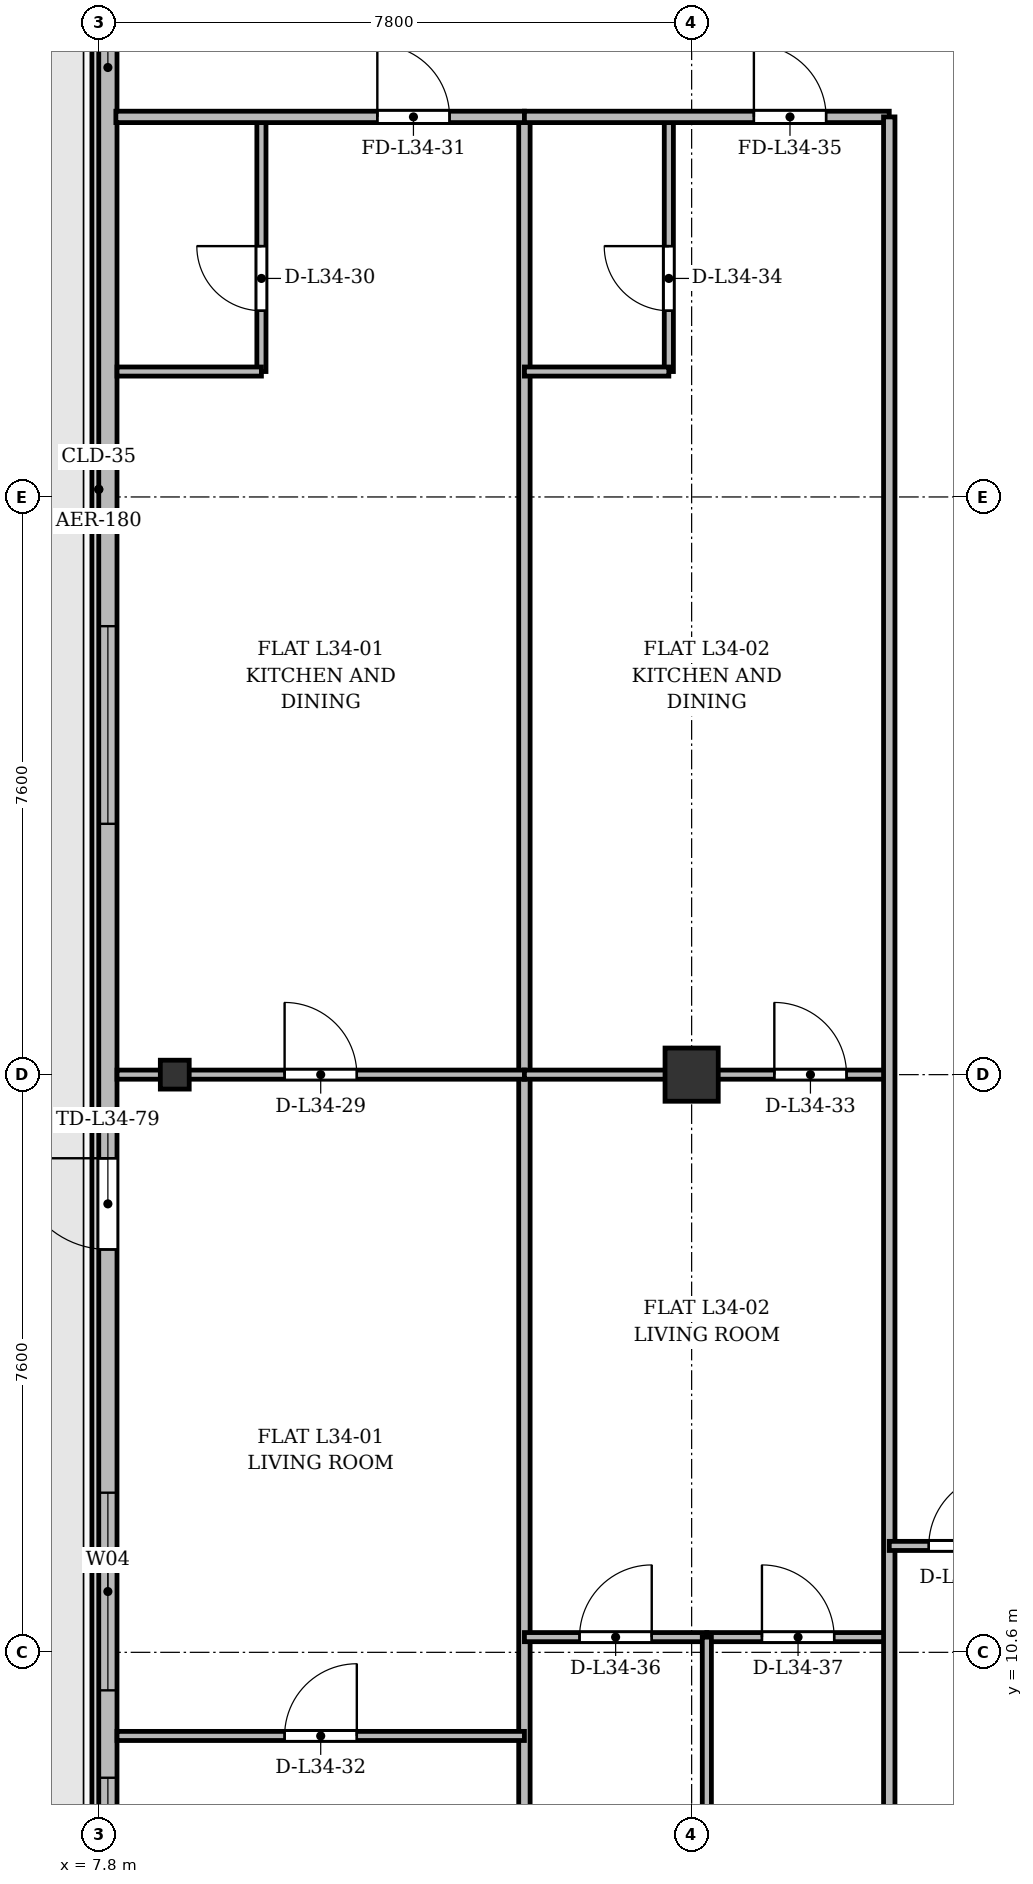
"""IFC4 building model, lengths in metres.
Left out: names, types, materials, properties, quantities, classifications, styles, units other than length and angle.
Written with IfcOpenShell. Run it as: python <this file> out.ifc"""

import sys

from ifc_helpers import new_model, si_unit, direction, frame, frame_2d, origin, origin_2d, place, context, subcontext, project, spatial, rectangle, i_section, extrude, source, transform, mapped, element, fill, save


model = new_model("IFC4")
c1 = context("Model", 3, precision=1e-05, world=origin(), true_north=direction((0.0, 1.0)))
c2 = subcontext(c1, "Body", "Model", "MODEL_VIEW")
j1 = project(units=[si_unit("LENGTHUNIT", "METRE"), si_unit("PLANEANGLEUNIT", "RADIAN")], contexts=[c1])
p1 = place(None, origin())
s1 = spatial("IfcSite", under=j1, at=p1, CompositionType="ELEMENT")
p2 = place(p1, origin())
s2 = spatial("IfcBuilding", under=s1, at=p2, CompositionType="ELEMENT")
p3 = place(p2, frame((0.0, 0.0, 132.1)))
s3 = spatial("IfcBuildingStorey", under=s2, at=p3, CompositionType="ELEMENT", Elevation=132.1)
m1 = source(origin(), c2, "Body", "SweptSolid", [
    extrude(i_section(OverallWidth=0.38, OverallDepth=0.38, WebThickness=0.02, FlangeThickness=0.03, at=origin_2d()), origin(), (0.0, 0.0, 1.0), 3.6),
])
p4 = place(p3, frame((8.8, 18.2, 0.0), z_axis=(0.0, 0.0, 1.0), x_axis=(1.0, 0.0, 0.0)))
e1 = element("IfcColumn", 1, at=p4, inside=s3, PredefinedType="COLUMN", context=c2, shape_type="MappedRepresentation", body=[
    mapped(m1, transform((0.0, 0.0, 0.0), x_axis=(1.0, 0.0, 0.0), y_axis=(0.0, 1.0, 0.0), z_axis=(0.0, 0.0, 1.0), scale=1.0)),
])
m2 = source(origin(), c2, "Body", "SweptSolid", [
    extrude(rectangle(XDim=0.7, YDim=0.7, at=origin_2d()), origin(), (0.0, 0.0, 1.0), 3.6),
])
p5 = place(p3, frame((15.6, 18.2, 0.0), z_axis=(0.0, 0.0, 1.0), x_axis=(1.0, 0.0, 0.0)))
e2 = element("IfcColumn", 2, at=p5, inside=s3, PredefinedType="COLUMN", context=c2, shape_type="MappedRepresentation", body=[
    mapped(m2, transform((0.0, 0.0, 0.0), x_axis=(1.0, 0.0, 0.0), y_axis=(0.0, 1.0, 0.0), z_axis=(0.0, 0.0, 1.0), scale=1.0)),
])
p6 = place(p3, frame((7.92, 6.3, 0.0), z_axis=(0.0, 0.0, 1.0), x_axis=(0.0, 1.0, 0.0)))
e3 = element("IfcWall", 3, at=p6, inside=s3, PredefinedType="SOLIDWALL", context=c2, shape_type="SweptSolid", body=[
    extrude(rectangle(XDim=39.2, YDim=0.24, at=frame_2d((19.6, 0.0))), origin(), (0.0, 0.0, 1.0), 3.35),
])
p7 = place(p6, frame((9.6, 0.0, 0.0)))
e4 = element("IfcOpeningElement", 4, at=p7, cuts=e3, PredefinedType="OPENING", context=c2, shape_type="SweptSolid", body=[
    extrude(rectangle(XDim=1.2, YDim=2.2, at=frame_2d((0.6, 1.1))), frame((0.0, 0.13, 0.0), z_axis=(0.0, -1.0, 0.0), x_axis=(1.0, 0.0, 0.0)), (0.0, 0.0, 1.0), 0.26),
])
p8 = place(p6, frame((1.45, 0.0, 0.92)))
e5 = element("IfcOpeningElement", 5, at=p8, cuts=e3, PredefinedType="OPENING", context=c2, shape_type="SweptSolid", body=[
    extrude(rectangle(XDim=1.2, YDim=1.65, at=frame_2d((0.6, 0.825))), frame((0.0, 0.13, 0.0), z_axis=(0.0, -1.0, 0.0), x_axis=(1.0, 0.0, 0.0)), (0.0, 0.0, 1.0), 0.26),
])
p9 = place(p6, frame((3.8, 0.0, 0.92)))
e6 = element("IfcOpeningElement", 6, at=p9, cuts=e3, PredefinedType="OPENING", context=c2, shape_type="SweptSolid", body=[
    extrude(rectangle(XDim=2.6, YDim=1.9, at=frame_2d((1.3, 0.95))), frame((0.0, 0.13, 0.0), z_axis=(0.0, -1.0, 0.0), x_axis=(1.0, 0.0, 0.0)), (0.0, 0.0, 1.0), 0.26),
])
p10 = place(p6, frame((15.2, 0.0, 0.92)))
e7 = element("IfcOpeningElement", 7, at=p10, cuts=e3, PredefinedType="OPENING", context=c2, shape_type="SweptSolid", body=[
    extrude(rectangle(XDim=2.6, YDim=1.9, at=frame_2d((1.3, 0.95))), frame((0.0, 0.13, 0.0), z_axis=(0.0, -1.0, 0.0), x_axis=(1.0, 0.0, 0.0)), (0.0, 0.0, 1.0), 0.26),
])
p11 = place(p6, frame((33.5, 0.0, 0.92)))
e8 = element("IfcOpeningElement", 8, at=p11, cuts=e3, PredefinedType="OPENING", context=c2, shape_type="SweptSolid", body=[
    extrude(rectangle(XDim=1.2, YDim=1.65, at=frame_2d((0.6, 0.825))), frame((0.0, 0.13, 0.0), z_axis=(0.0, -1.0, 0.0), x_axis=(1.0, 0.0, 0.0)), (0.0, 0.0, 1.0), 0.26),
])
p12 = place(p6, frame((36.85, 0.0, 0.92)))
e9 = element("IfcOpeningElement", 9, at=p12, cuts=e3, PredefinedType="OPENING", context=c2, shape_type="SweptSolid", body=[
    extrude(rectangle(XDim=1.2, YDim=1.65, at=frame_2d((0.6, 0.825))), frame((0.0, 0.13, 0.0), z_axis=(0.0, -1.0, 0.0), x_axis=(1.0, 0.0, 0.0)), (0.0, 0.0, 1.0), 0.26),
])
p13 = place(p3, frame((13.4, 3.525, 0.0), z_axis=(0.0, 0.0, 1.0), x_axis=(0.0, 1.0, 0.0)))
e10 = element("IfcWall", 10, at=p13, inside=s3, PredefinedType="PARTITIONING", context=c2, shape_type="SweptSolid", body=[
    extrude(rectangle(XDim=27.275, YDim=0.15, at=frame_2d((13.638, 0.0))), origin(), (0.0, 0.0, 1.0), 2.75),
])
p14 = place(p3, frame((8.04, 18.2, 0.0), z_axis=(0.0, 0.0, 1.0), x_axis=(1.0, 0.0, 0.0)))
e11 = element("IfcWall", 11, at=p14, inside=s3, PredefinedType="PARTITIONING", context=c2, shape_type="SweptSolid", body=[
    extrude(rectangle(XDim=5.36, YDim=0.12, at=frame_2d((2.68, 0.0))), origin(), (0.0, 0.0, 1.0), 2.75),
])
p15 = place(p14, frame((2.205, 0.0, 0.0)))
e12 = element("IfcOpeningElement", 12, at=p15, cuts=e11, PredefinedType="OPENING", context=c2, shape_type="SweptSolid", body=[
    extrude(rectangle(XDim=0.95, YDim=2.15, at=frame_2d((0.475, 1.075))), frame((0.0, 0.07, 0.0), z_axis=(0.0, -1.0, 0.0), x_axis=(1.0, 0.0, 0.0)), (0.0, 0.0, 1.0), 0.14),
])
p16 = place(p3, frame((9.94, 27.45, 0.0), z_axis=(0.0, 0.0, 1.0), x_axis=(0.0, 1.0, 0.0)))
e13 = element("IfcWall", 13, at=p16, inside=s3, PredefinedType="PARTITIONING", context=c2, shape_type="SweptSolid", body=[
    extrude(rectangle(XDim=3.35, YDim=0.12, at=frame_2d((1.675, 0.0))), origin(), (0.0, 0.0, 1.0), 3.35),
])
p17 = place(p16, frame((0.8, 0.0, 0.0)))
e14 = element("IfcOpeningElement", 14, at=p17, cuts=e13, PredefinedType="OPENING", context=c2, shape_type="SweptSolid", body=[
    extrude(rectangle(XDim=0.85, YDim=2.1, at=frame_2d((0.425, 1.05))), frame((0.0, 0.07, 0.0), z_axis=(0.0, -1.0, 0.0), x_axis=(1.0, 0.0, 0.0)), (0.0, 0.0, 1.0), 0.14),
])
p18 = place(p3, frame((8.04, 27.45, 0.0), z_axis=(0.0, 0.0, 1.0), x_axis=(1.0, 0.0, 0.0)))
e15 = element("IfcWall", 15, at=p18, inside=s3, PredefinedType="PARTITIONING", context=c2, shape_type="SweptSolid", body=[
    extrude(rectangle(XDim=1.9, YDim=0.12, at=frame_2d((0.95, 0.0))), origin(), (0.0, 0.0, 1.0), 2.85),
])
p19 = place(p3, frame((8.025, 30.8, 0.0), z_axis=(0.0, 0.0, 1.0), x_axis=(1.0, 0.0, 0.0)))
e16 = element("IfcWall", 16, at=p19, inside=s3, PredefinedType="PARTITIONING", context=c2, shape_type="SweptSolid", body=[
    extrude(rectangle(XDim=5.375, YDim=0.15, at=frame_2d((2.688, 0.0))), origin(), (0.0, 0.0, 1.0), 2.85),
])
p20 = place(p19, frame((3.44, 0.0, 0.0)))
e17 = element("IfcOpeningElement", 17, at=p20, cuts=e16, PredefinedType="OPENING", context=c2, shape_type="SweptSolid", body=[
    extrude(rectangle(XDim=0.95, YDim=2.15, at=frame_2d((0.475, 1.075))), frame((0.0, 0.085, 0.0), z_axis=(0.0, -1.0, 0.0), x_axis=(1.0, 0.0, 0.0)), (0.0, 0.0, 1.0), 0.17),
])
p21 = place(p3, frame((8.04, 9.5, 0.0), z_axis=(0.0, 0.0, 1.0), x_axis=(1.0, 0.0, 0.0)))
e18 = element("IfcWall", 18, at=p21, inside=s3, PredefinedType="PARTITIONING", context=c2, shape_type="SweptSolid", body=[
    extrude(rectangle(XDim=5.36, YDim=0.12, at=frame_2d((2.68, 0.0))), origin(), (0.0, 0.0, 1.0), 2.85),
])
p22 = place(p21, frame((2.205, 0.0, 0.0)))
e19 = element("IfcOpeningElement", 19, at=p22, cuts=e18, PredefinedType="OPENING", context=c2, shape_type="SweptSolid", body=[
    extrude(rectangle(XDim=0.95, YDim=2.15, at=frame_2d((0.475, 1.075))), frame((0.0, 0.07, 0.0), z_axis=(0.0, -1.0, 0.0), x_axis=(1.0, 0.0, 0.0)), (0.0, 0.0, 1.0), 0.14),
])
p23 = place(p3, frame((13.4, 18.2, 0.0), z_axis=(0.0, 0.0, 1.0), x_axis=(1.0, 0.0, 0.0)))
e20 = element("IfcWall", 20, at=p23, inside=s3, PredefinedType="PARTITIONING", context=c2, shape_type="SweptSolid", body=[
    extrude(rectangle(XDim=4.8, YDim=0.12, at=frame_2d((2.4, 0.0))), origin(), (0.0, 0.0, 1.0), 2.75),
])
p24 = place(p23, frame((3.288, 0.0, 0.0)))
e21 = element("IfcOpeningElement", 21, at=p24, cuts=e20, PredefinedType="OPENING", context=c2, shape_type="SweptSolid", body=[
    extrude(rectangle(XDim=0.95, YDim=2.15, at=frame_2d((0.475, 1.075))), frame((0.0, 0.07, 0.0), z_axis=(0.0, -1.0, 0.0), x_axis=(1.0, 0.0, 0.0)), (0.0, 0.0, 1.0), 0.14),
])
p25 = place(p3, frame((15.3, 27.45, 0.0), z_axis=(0.0, 0.0, 1.0), x_axis=(0.0, 1.0, 0.0)))
e22 = element("IfcWall", 22, at=p25, inside=s3, PredefinedType="PARTITIONING", context=c2, shape_type="SweptSolid", body=[
    extrude(rectangle(XDim=3.35, YDim=0.12, at=frame_2d((1.675, 0.0))), origin(), (0.0, 0.0, 1.0), 3.35),
])
p26 = place(p25, frame((0.8, 0.0, 0.0)))
e23 = element("IfcOpeningElement", 23, at=p26, cuts=e22, PredefinedType="OPENING", context=c2, shape_type="SweptSolid", body=[
    extrude(rectangle(XDim=0.85, YDim=2.1, at=frame_2d((0.425, 1.05))), frame((0.0, 0.07, 0.0), z_axis=(0.0, -1.0, 0.0), x_axis=(1.0, 0.0, 0.0)), (0.0, 0.0, 1.0), 0.14),
])
p27 = place(p3, frame((13.4, 27.45, 0.0), z_axis=(0.0, 0.0, 1.0), x_axis=(1.0, 0.0, 0.0)))
e24 = element("IfcWall", 24, at=p27, inside=s3, PredefinedType="PARTITIONING", context=c2, shape_type="SweptSolid", body=[
    extrude(rectangle(XDim=1.9, YDim=0.12, at=frame_2d((0.95, 0.0))), origin(), (0.0, 0.0, 1.0), 3.35),
])
p28 = place(p3, frame((13.4, 30.8, 0.0), z_axis=(0.0, 0.0, 1.0), x_axis=(1.0, 0.0, 0.0)))
e25 = element("IfcWall", 25, at=p28, inside=s3, PredefinedType="PARTITIONING", context=c2, shape_type="SweptSolid", body=[
    extrude(rectangle(XDim=4.8, YDim=0.15, at=frame_2d((2.4, 0.0))), origin(), (0.0, 0.0, 1.0), 2.85),
])
p29 = place(p28, frame((3.019, 0.0, 0.0)))
e26 = element("IfcOpeningElement", 26, at=p29, cuts=e25, PredefinedType="OPENING", context=c2, shape_type="SweptSolid", body=[
    extrude(rectangle(XDim=0.95, YDim=2.15, at=frame_2d((0.475, 1.075))), frame((0.0, 0.085, 0.0), z_axis=(0.0, -1.0, 0.0), x_axis=(1.0, 0.0, 0.0)), (0.0, 0.0, 1.0), 0.17),
])
p30 = place(p3, frame((13.4, 10.8, 0.0), z_axis=(0.0, 0.0, 1.0), x_axis=(1.0, 0.0, 0.0)))
e27 = element("IfcWall", 27, at=p30, inside=s3, PredefinedType="PARTITIONING", context=c2, shape_type="SweptSolid", body=[
    extrude(rectangle(XDim=2.4, YDim=0.12, at=frame_2d((1.2, 0.0))), origin(), (0.0, 0.0, 1.0), 2.85),
])
p31 = place(p30, frame((0.725, 0.0, 0.0)))
e28 = element("IfcOpeningElement", 28, at=p31, cuts=e27, PredefinedType="OPENING", context=c2, shape_type="SweptSolid", body=[
    extrude(rectangle(XDim=0.95, YDim=2.15, at=frame_2d((0.475, 1.075))), frame((0.0, 0.07, 0.0), z_axis=(0.0, -1.0, 0.0), x_axis=(1.0, 0.0, 0.0)), (0.0, 0.0, 1.0), 0.14),
])
p32 = place(p3, frame((15.8, 10.8, 0.0), z_axis=(0.0, 0.0, 1.0), x_axis=(1.0, 0.0, 0.0)))
e29 = element("IfcWall", 29, at=p32, inside=s3, PredefinedType="PARTITIONING", context=c2, shape_type="SweptSolid", body=[
    extrude(rectangle(XDim=2.4, YDim=0.12, at=frame_2d((1.2, 0.0))), origin(), (0.0, 0.0, 1.0), 3.0),
])
p33 = place(p32, frame((0.725, 0.0, 0.0)))
e30 = element("IfcOpeningElement", 30, at=p33, cuts=e29, PredefinedType="OPENING", context=c2, shape_type="SweptSolid", body=[
    extrude(rectangle(XDim=0.95, YDim=2.15, at=frame_2d((0.475, 1.075))), frame((0.0, 0.07, 0.0), z_axis=(0.0, -1.0, 0.0), x_axis=(1.0, 0.0, 0.0)), (0.0, 0.0, 1.0), 0.14),
])
p34 = place(p3, frame((15.8, 3.525, 0.0), z_axis=(0.0, 0.0, 1.0), x_axis=(0.0, 1.0, 0.0)))
e31 = element("IfcWall", 31, at=p34, inside=s3, PredefinedType="PARTITIONING", context=c2, shape_type="SweptSolid", body=[
    extrude(rectangle(XDim=7.275, YDim=0.12, at=frame_2d((3.638, 0.0))), origin(), (0.0, 0.0, 1.0), 2.75),
])
p35 = place(p3, frame((18.2, 3.525, 0.0), z_axis=(0.0, 0.0, 1.0), x_axis=(0.0, 1.0, 0.0)))
e32 = element("IfcWall", 32, at=p35, inside=s3, PredefinedType="PARTITIONING", context=c2, shape_type="SweptSolid", body=[
    extrude(rectangle(XDim=27.275, YDim=0.15, at=frame_2d((13.638, 0.0))), origin(), (0.0, 0.0, 1.0), 2.75),
])
p36 = place(p3, frame((18.2, 12.0, 0.0), z_axis=(0.0, 0.0, 1.0), x_axis=(1.0, 0.0, 0.0)))
e33 = element("IfcWall", 33, at=p36, inside=s3, PredefinedType="PARTITIONING", context=c2, shape_type="SweptSolid", body=[
    extrude(rectangle(XDim=2.0, YDim=0.12, at=frame_2d((1.0, 0.0))), origin(), (0.0, 0.0, 1.0), 3.35),
])
p37 = place(p36, frame((0.52, 0.0, 0.0)))
e34 = element("IfcOpeningElement", 34, at=p37, cuts=e33, PredefinedType="OPENING", context=c2, shape_type="SweptSolid", body=[
    extrude(rectangle(XDim=0.95, YDim=2.15, at=frame_2d((0.475, 1.075))), frame((0.0, 0.07, 0.0), z_axis=(0.0, -1.0, 0.0), x_axis=(1.0, 0.0, 0.0)), (0.0, 0.0, 1.0), 0.14),
])
m3 = source(origin(), c2, "Body", "SweptSolid", [
    extrude(rectangle(XDim=1.2, YDim=2.2, at=frame_2d((0.6, 1.1))), frame((0.0, 0.025, 0.0), z_axis=(0.0, -1.0, 0.0), x_axis=(1.0, 0.0, 0.0)), (0.0, 0.0, 1.0), 0.05),
])
p38 = place(p7, origin())
e35 = element("IfcDoor", 35, at=p38, inside=s3, OperationType="SINGLE_SWING_RIGHT", PredefinedType="DOOR", context=c2, shape_type="MappedRepresentation", body=[
    mapped(m3, transform((0.0, 0.0, 0.0), x_axis=(1.0, 0.0, 0.0), y_axis=(0.0, 1.0, 0.0), z_axis=(0.0, 0.0, 1.0), scale=1.0)),
])
fill(e4, e35)
m4 = source(origin(), c2, "Body", "SweptSolid", [
    extrude(rectangle(XDim=1.2, YDim=1.65, at=frame_2d((0.6, 0.825))), frame((0.0, 0.03, 0.0), z_axis=(0.0, -1.0, 0.0), x_axis=(1.0, 0.0, 0.0)), (0.0, 0.0, 1.0), 0.06),
])
p39 = place(p8, origin())
e36 = element("IfcWindow", 36, at=p39, inside=s3, PartitioningType="SINGLE_PANEL", PredefinedType="WINDOW", context=c2, shape_type="MappedRepresentation", body=[
    mapped(m4, transform((0.0, 0.0, 0.0), x_axis=(1.0, 0.0, 0.0), y_axis=(0.0, 1.0, 0.0), z_axis=(0.0, 0.0, 1.0), scale=1.0)),
])
fill(e5, e36)
m5 = source(origin(), c2, "Body", "SweptSolid", [
    extrude(rectangle(XDim=2.6, YDim=1.9, at=frame_2d((1.3, 0.95))), frame((0.0, 0.03, 0.0), z_axis=(0.0, -1.0, 0.0), x_axis=(1.0, 0.0, 0.0)), (0.0, 0.0, 1.0), 0.06),
])
p40 = place(p9, origin())
e37 = element("IfcWindow", 37, at=p40, inside=s3, PartitioningType="SINGLE_PANEL", PredefinedType="WINDOW", context=c2, shape_type="MappedRepresentation", body=[
    mapped(m5, transform((0.0, 0.0, 0.0), x_axis=(1.0, 0.0, 0.0), y_axis=(0.0, 1.0, 0.0), z_axis=(0.0, 0.0, 1.0), scale=1.0)),
])
fill(e6, e37)
p41 = place(p10, origin())
e38 = element("IfcWindow", 38, at=p41, inside=s3, PartitioningType="SINGLE_PANEL", PredefinedType="WINDOW", context=c2, shape_type="MappedRepresentation", body=[
    mapped(m5, transform((0.0, 0.0, 0.0), x_axis=(1.0, 0.0, 0.0), y_axis=(0.0, 1.0, 0.0), z_axis=(0.0, 0.0, 1.0), scale=1.0)),
])
fill(e7, e38)
m6 = source(origin(), c2, "Body", "SweptSolid", [
    extrude(rectangle(XDim=0.95, YDim=2.15, at=frame_2d((0.475, 1.075))), frame((0.0, 0.025, 0.0), z_axis=(0.0, -1.0, 0.0), x_axis=(1.0, 0.0, 0.0)), (0.0, 0.0, 1.0), 0.05),
])
p42 = place(p15, origin())
e39 = element("IfcDoor", 39, at=p42, inside=s3, OperationType="SINGLE_SWING_LEFT", PredefinedType="DOOR", context=c2, shape_type="MappedRepresentation", body=[
    mapped(m6, transform((0.0, 0.0, 0.0), x_axis=(1.0, 0.0, 0.0), y_axis=(0.0, 1.0, 0.0), z_axis=(0.0, 0.0, 1.0), scale=1.0)),
])
fill(e12, e39)
m7 = source(origin(), c2, "Body", "SweptSolid", [
    extrude(rectangle(XDim=0.85, YDim=2.1, at=frame_2d((0.425, 1.05))), frame((0.0, 0.025, 0.0), z_axis=(0.0, -1.0, 0.0), x_axis=(1.0, 0.0, 0.0)), (0.0, 0.0, 1.0), 0.05),
])
p43 = place(p17, origin())
e40 = element("IfcDoor", 40, at=p43, inside=s3, OperationType="SINGLE_SWING_RIGHT", PredefinedType="DOOR", context=c2, shape_type="MappedRepresentation", body=[
    mapped(m7, transform((0.0, 0.0, 0.0), x_axis=(1.0, 0.0, 0.0), y_axis=(0.0, 1.0, 0.0), z_axis=(0.0, 0.0, 1.0), scale=1.0)),
])
fill(e14, e40)
p44 = place(p20, origin())
e41 = element("IfcDoor", 41, at=p44, inside=s3, OperationType="SINGLE_SWING_LEFT", PredefinedType="DOOR", context=c2, shape_type="MappedRepresentation", body=[
    mapped(m6, transform((0.0, 0.0, 0.0), x_axis=(1.0, 0.0, 0.0), y_axis=(0.0, 1.0, 0.0), z_axis=(0.0, 0.0, 1.0), scale=1.0)),
])
fill(e17, e41)
p45 = place(p22, origin())
e42 = element("IfcDoor", 42, at=p45, inside=s3, OperationType="SINGLE_SWING_RIGHT", PredefinedType="DOOR", context=c2, shape_type="MappedRepresentation", body=[
    mapped(m6, transform((0.0, 0.0, 0.0), x_axis=(1.0, 0.0, 0.0), y_axis=(0.0, 1.0, 0.0), z_axis=(0.0, 0.0, 1.0), scale=1.0)),
])
fill(e19, e42)
p46 = place(p24, origin())
e43 = element("IfcDoor", 43, at=p46, inside=s3, OperationType="SINGLE_SWING_LEFT", PredefinedType="DOOR", context=c2, shape_type="MappedRepresentation", body=[
    mapped(m6, transform((0.0, 0.0, 0.0), x_axis=(1.0, 0.0, 0.0), y_axis=(0.0, 1.0, 0.0), z_axis=(0.0, 0.0, 1.0), scale=1.0)),
])
fill(e21, e43)
p47 = place(p26, origin())
e44 = element("IfcDoor", 44, at=p47, inside=s3, OperationType="SINGLE_SWING_RIGHT", PredefinedType="DOOR", context=c2, shape_type="MappedRepresentation", body=[
    mapped(m7, transform((0.0, 0.0, 0.0), x_axis=(1.0, 0.0, 0.0), y_axis=(0.0, 1.0, 0.0), z_axis=(0.0, 0.0, 1.0), scale=1.0)),
])
fill(e23, e44)
p48 = place(p29, origin())
e45 = element("IfcDoor", 45, at=p48, inside=s3, OperationType="SINGLE_SWING_LEFT", PredefinedType="DOOR", context=c2, shape_type="MappedRepresentation", body=[
    mapped(m6, transform((0.0, 0.0, 0.0), x_axis=(1.0, 0.0, 0.0), y_axis=(0.0, 1.0, 0.0), z_axis=(0.0, 0.0, 1.0), scale=1.0)),
])
fill(e26, e45)
p49 = place(p31, origin())
e46 = element("IfcDoor", 46, at=p49, inside=s3, OperationType="SINGLE_SWING_RIGHT", PredefinedType="DOOR", context=c2, shape_type="MappedRepresentation", body=[
    mapped(m6, transform((0.0, 0.0, 0.0), x_axis=(1.0, 0.0, 0.0), y_axis=(0.0, 1.0, 0.0), z_axis=(0.0, 0.0, 1.0), scale=1.0)),
])
fill(e28, e46)
p50 = place(p33, origin())
e47 = element("IfcDoor", 47, at=p50, inside=s3, OperationType="SINGLE_SWING_LEFT", PredefinedType="DOOR", context=c2, shape_type="MappedRepresentation", body=[
    mapped(m6, transform((0.0, 0.0, 0.0), x_axis=(1.0, 0.0, 0.0), y_axis=(0.0, 1.0, 0.0), z_axis=(0.0, 0.0, 1.0), scale=1.0)),
])
fill(e30, e47)
p51 = place(p37, origin())
e48 = element("IfcDoor", 48, at=p51, inside=s3, OperationType="SINGLE_SWING_RIGHT", PredefinedType="DOOR", context=c2, shape_type="MappedRepresentation", body=[
    mapped(m6, transform((0.0, 0.0, 0.0), x_axis=(1.0, 0.0, 0.0), y_axis=(0.0, 1.0, 0.0), z_axis=(0.0, 0.0, 1.0), scale=1.0)),
])
fill(e34, e48)
save(model, sys.argv[1])
